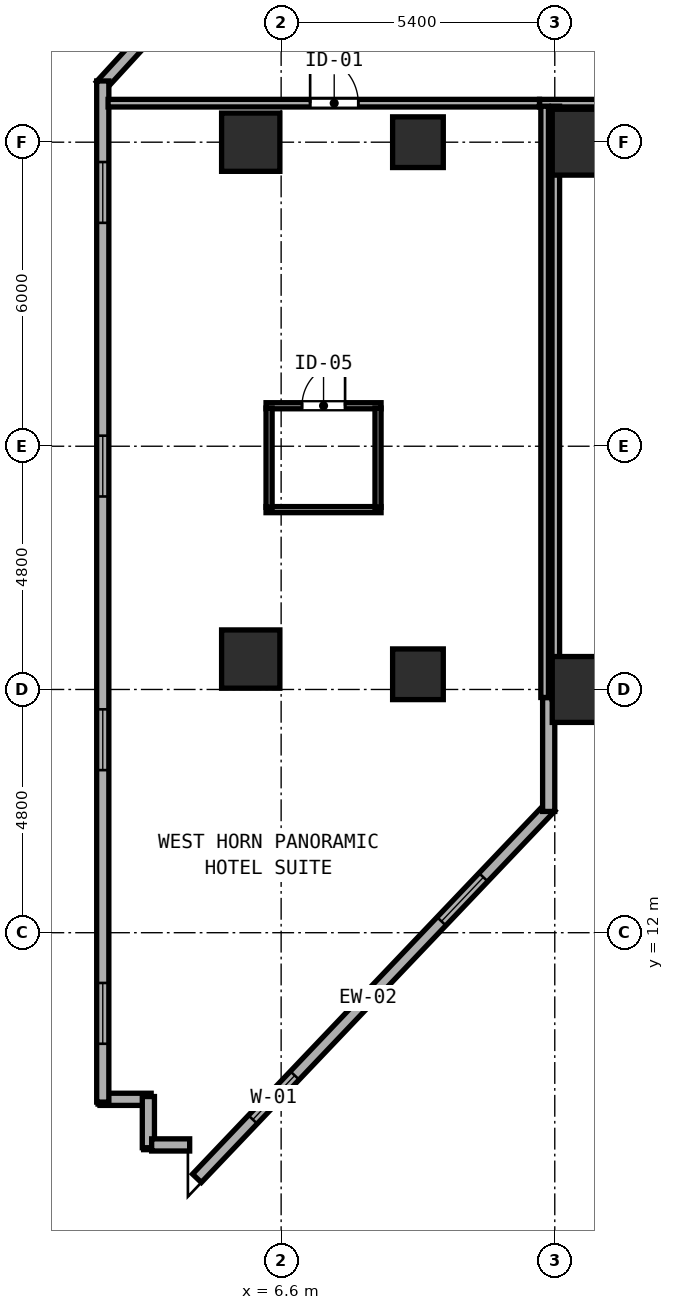
"""IFC4 building model, lengths in metres.
Left out: names, types, materials, properties, quantities, classifications, styles, units other than length and angle.
Written with IfcOpenShell. Run it as: python <this file> out.ifc"""

import sys

from ifc_helpers import new_model, si_unit, direction, frame, frame_2d, origin, origin_2d, place, context, subcontext, project, spatial, rectangle, hollow_rectangle, extrude, element, fill, save


model = new_model("IFC4")
c1 = context("Model", 3, precision=1e-05, world=origin(), true_north=direction((0.0, 1.0)))
c2 = subcontext(c1, "Body", "Model", "MODEL_VIEW")
j1 = project(units=[si_unit("LENGTHUNIT", "METRE"), si_unit("PLANEANGLEUNIT", "RADIAN")], contexts=[c1])
p1 = place(None, origin())
s1 = spatial("IfcSite", under=j1, at=p1, CompositionType="ELEMENT")
p2 = place(p1, origin())
s2 = spatial("IfcBuilding", under=s1, at=p2, CompositionType="ELEMENT")
p3 = place(p2, frame((0.0, 0.0, 31.6)))
s3 = spatial("IfcBuildingStorey", under=s2, at=p3, CompositionType="ELEMENT", Elevation=31.6)
for number, where, z_axis, x_axis in (
    (1, (12.6, 16.8, 0.0), (0.0, 0.0, 1.0), (1.0, 0.0, 0.0)),
    (2, (12.6, 27.6, 0.0), (0.0, 0.0, 1.0), (1.0, 0.0, 0.0)),
):
    element("IfcColumn", number, at=place(p3, frame(where, z_axis=z_axis, x_axis=x_axis)), inside=s3, PredefinedType="COLUMN", context=c2, shape_type="SweptSolid", body=[
        extrude(hollow_rectangle(XDim=1.3, YDim=1.3, WallThickness=0.048, at=origin_2d()), origin(), (0.0, 0.0, 1.0), 3.8),
    ])
for number, where, z_axis, x_axis in (
    (3, (6.0, 17.4, 0.0), (0.0, 0.0, 1.0), (1.0, 0.0, 0.0)),
    (4, (6.0, 27.6, 0.0), (0.0, 0.0, 1.0), (1.0, 0.0, 0.0)),
):
    element("IfcColumn", number, at=place(p3, frame(where, z_axis=z_axis, x_axis=x_axis)), inside=s3, PredefinedType="COLUMN", context=c2, shape_type="SweptSolid", body=[
        extrude(hollow_rectangle(XDim=1.15, YDim=1.15, WallThickness=0.042, at=origin_2d()), origin(), (0.0, 0.0, 1.0), 3.8),
    ])
for number, where, z_axis, x_axis in (
    (5, (9.3, 17.1, 0.0), (0.0, 0.0, 1.0), (1.0, 0.0, 0.0)),
    (6, (9.3, 27.6, 0.0), (0.0, 0.0, 1.0), (1.0, 0.0, 0.0)),
):
    element("IfcColumn", number, at=place(p3, frame(where, z_axis=z_axis, x_axis=x_axis)), inside=s3, PredefinedType="COLUMN", context=c2, shape_type="SweptSolid", body=[
        extrude(hollow_rectangle(XDim=1.0, YDim=1.0, WallThickness=0.038, at=origin_2d()), origin(), (0.0, 0.0, 1.0), 3.8),
    ])
for number, where, z_axis, x_axis in (
    (7, (3.025, 8.712, 0.0), (0.0, 0.0, 1.0), (1.0, 0.0, 0.0)),
    (8, (3.98, 8.767, 0.0), (0.0, 0.0, 1.0), (0.0, -1.0, 0.0)),
):
    element("IfcWall", number, at=place(p3, frame(where, z_axis=z_axis, x_axis=x_axis)), inside=s3, PredefinedType="SOLIDWALL", context=c2, shape_type="SweptSolid", body=[
        extrude(rectangle(XDim=1.01, YDim=0.24, at=frame_2d((0.505, 0.0))), origin(), (0.0, 0.0, 1.0), 3.6),
    ])
p4 = place(p3, frame((4.045, 7.812, 0.0), z_axis=(0.0, 0.0, 1.0), x_axis=(1.0, 0.0, 0.0)))
e9 = element("IfcWall", 9, at=p4, inside=s3, PredefinedType="SOLIDWALL", context=c2, shape_type="SweptSolid", body=[
    extrude(rectangle(XDim=0.75, YDim=0.24, at=frame_2d((0.375, 0.0))), origin(), (0.0, 0.0, 1.0), 3.6),
])
p5 = place(p3, frame((4.939, 7.154, 0.0), z_axis=(0.0, 0.0, 1.0), x_axis=(0.689370300416, 0.724409130881, 0.0)))
e10 = element("IfcWall", 10, at=p5, inside=s3, PredefinedType="SOLIDWALL", context=c2, shape_type="SweptSolid", body=[
    extrude(rectangle(XDim=10.124, YDim=0.24, at=frame_2d((5.062, 0.0))), origin(), (0.0, 0.0, 1.0), 3.6),
])
p6 = place(p5, frame((1.6, 0.0, 0.85)))
e11 = element("IfcOpeningElement", 11, at=p6, cuts=e10, PredefinedType="OPENING", context=c2, shape_type="SweptSolid", body=[
    extrude(rectangle(XDim=1.2, YDim=1.85, at=frame_2d((0.6, 0.925))), frame((0.0, 0.13, 0.0), z_axis=(0.0, -1.0, 0.0), x_axis=(1.0, 0.0, 0.0)), (0.0, 0.0, 1.0), 0.26),
])
p7 = place(p5, frame((7.0, 0.0, 0.85)))
e12 = element("IfcOpeningElement", 12, at=p7, cuts=e10, PredefinedType="OPENING", context=c2, shape_type="SweptSolid", body=[
    extrude(rectangle(XDim=1.2, YDim=1.85, at=frame_2d((0.6, 0.925))), frame((0.0, 0.13, 0.0), z_axis=(0.0, -1.0, 0.0), x_axis=(1.0, 0.0, 0.0)), (0.0, 0.0, 1.0), 0.26),
])
p8 = place(p3, frame((11.88, 14.393, 0.0), z_axis=(0.0, 0.0, 1.0), x_axis=(0.0, 1.0, 0.0)))
e13 = element("IfcWall", 13, at=p8, inside=s3, PredefinedType="SOLIDWALL", context=c2, shape_type="SweptSolid", body=[
    extrude(rectangle(XDim=2.247, YDim=0.24, at=frame_2d((1.124, 0.0))), origin(), (0.0, 0.0, 1.0), 3.6),
])
p9 = place(p3, frame((5.265, 31.137, 0.0), z_axis=(0.0, 0.0, 1.0), x_axis=(-0.675785130265, -0.737098675696, 0.0)))
e14 = element("IfcWall", 14, at=p9, inside=s3, PredefinedType="SOLIDWALL", context=c2, shape_type="SweptSolid", body=[
    extrude(rectangle(XDim=3.289, YDim=0.24, at=frame_2d((1.645, 0.0))), origin(), (0.0, 0.0, 1.0), 3.6),
])
p10 = place(p3, frame((3.08, 28.808, 0.0), z_axis=(0.0, 0.0, 1.0), x_axis=(0.0, -1.0, 0.0)))
e15 = element("IfcWall", 15, at=p10, inside=s3, PredefinedType="SOLIDWALL", context=c2, shape_type="SweptSolid", body=[
    extrude(rectangle(XDim=20.151, YDim=0.24, at=frame_2d((10.076, 0.0))), origin(), (0.0, 0.0, 1.0), 3.6),
])
p11 = place(p10, frame((1.6, 0.0, 0.85)))
e16 = element("IfcOpeningElement", 16, at=p11, cuts=e15, PredefinedType="OPENING", context=c2, shape_type="SweptSolid", body=[
    extrude(rectangle(XDim=1.2, YDim=1.85, at=frame_2d((0.6, 0.925))), frame((0.0, 0.13, 0.0), z_axis=(0.0, -1.0, 0.0), x_axis=(1.0, 0.0, 0.0)), (0.0, 0.0, 1.0), 0.26),
])
p12 = place(p10, frame((7.0, 0.0, 0.85)))
e17 = element("IfcOpeningElement", 17, at=p12, cuts=e15, PredefinedType="OPENING", context=c2, shape_type="SweptSolid", body=[
    extrude(rectangle(XDim=1.2, YDim=1.85, at=frame_2d((0.6, 0.925))), frame((0.0, 0.13, 0.0), z_axis=(0.0, -1.0, 0.0), x_axis=(1.0, 0.0, 0.0)), (0.0, 0.0, 1.0), 0.26),
])
p13 = place(p10, frame((12.4, 0.0, 0.85)))
e18 = element("IfcOpeningElement", 18, at=p13, cuts=e15, PredefinedType="OPENING", context=c2, shape_type="SweptSolid", body=[
    extrude(rectangle(XDim=1.2, YDim=1.85, at=frame_2d((0.6, 0.925))), frame((0.0, 0.13, 0.0), z_axis=(0.0, -1.0, 0.0), x_axis=(1.0, 0.0, 0.0)), (0.0, 0.0, 1.0), 0.26),
])
p14 = place(p10, frame((17.8, 0.0, 0.85)))
e19 = element("IfcOpeningElement", 19, at=p14, cuts=e15, PredefinedType="OPENING", context=c2, shape_type="SweptSolid", body=[
    extrude(rectangle(XDim=1.2, YDim=1.85, at=frame_2d((0.6, 0.925))), frame((0.0, 0.13, 0.0), z_axis=(0.0, -1.0, 0.0), x_axis=(1.0, 0.0, 0.0)), (0.0, 0.0, 1.0), 0.26),
])
p15 = place(p3, frame((11.7, 28.37, 0.0), z_axis=(0.0, 0.0, 1.0), x_axis=(1.0, 0.0, 0.0)))
e20 = element("IfcWall", 20, at=p15, inside=s3, PredefinedType="PARTITIONING", context=c2, shape_type="SweptSolid", body=[
    extrude(rectangle(XDim=5.81, YDim=0.15, at=frame_2d((2.905, 0.0))), origin(), (0.0, 0.0, 1.0), 3.6),
])
p16 = place(p15, frame((5.488, 0.0, 0.0), z_axis=(0.0, 0.0, 1.0), x_axis=(-1.0, 0.0, 0.0)))
e21 = element("IfcOpeningElement", 21, at=p16, cuts=e20, PredefinedType="OPENING", context=c2, shape_type="SweptSolid", body=[
    extrude(rectangle(XDim=0.95, YDim=2.18, at=frame_2d((0.475, 1.09))), frame((0.0, 0.085, 0.0), z_axis=(0.0, -1.0, 0.0), x_axis=(1.0, 0.0, 0.0)), (0.0, 0.0, 1.0), 0.17),
])
p17 = place(p3, frame((11.8, 16.642, 0.0), z_axis=(0.0, 0.0, 1.0), x_axis=(0.0, 1.0, 0.0)))
e22 = element("IfcWall", 22, at=p17, inside=s3, PredefinedType="PARTITIONING", context=c2, shape_type="SweptSolid", body=[
    extrude(rectangle(XDim=11.668, YDim=0.15, at=frame_2d((5.834, 0.0))), origin(), (0.0, 0.0, 1.0), 3.6),
])
p18 = place(p3, frame((3.185, 28.37, 0.0), z_axis=(0.0, 0.0, 1.0), x_axis=(1.0, 0.0, 0.0)))
e23 = element("IfcWall", 23, at=p18, inside=s3, PredefinedType="PARTITIONING", context=c2, shape_type="SweptSolid", body=[
    extrude(rectangle(XDim=8.513, YDim=0.15, at=frame_2d((4.256, 0.0))), origin(), (0.0, 0.0, 1.0), 3.6),
])
p19 = place(p18, frame((4.937, 0.0, 0.0), z_axis=(0.0, 0.0, 1.0), x_axis=(-1.0, 0.0, 0.0)))
e24 = element("IfcOpeningElement", 24, at=p19, cuts=e23, PredefinedType="OPENING", context=c2, shape_type="SweptSolid", body=[
    extrude(rectangle(XDim=0.95, YDim=2.18, at=frame_2d((0.475, 1.09))), frame((0.0, 0.085, 0.0), z_axis=(0.0, -1.0, 0.0), x_axis=(1.0, 0.0, 0.0)), (0.0, 0.0, 1.0), 0.17),
])
p20 = place(p3, frame((12.02, 16.612, 0.0), z_axis=(0.0, 0.0, 1.0), x_axis=(0.0, 1.0, 0.0)))
e25 = element("IfcWall", 25, at=p20, inside=s3, PredefinedType="PARTITIONING", context=c2, shape_type="SweptSolid", body=[
    extrude(rectangle(XDim=11.698, YDim=0.15, at=frame_2d((5.849, 0.0))), origin(), (0.0, 0.0, 1.0), 3.6),
])
p21 = place(p3, frame((6.302, 22.399, 0.0), z_axis=(0.0, 0.0, 1.0), x_axis=(1.0, 0.0, 0.0)))
e26 = element("IfcWall", 26, at=p21, inside=s3, PredefinedType="PARTITIONING", context=c2, shape_type="SweptSolid", body=[
    extrude(rectangle(XDim=2.27, YDim=0.12, at=frame_2d((1.135, 0.0))), origin(), (0.0, 0.0, 1.0), 3.6),
])
p22 = place(p21, frame((1.56, 0.0, 0.0), z_axis=(0.0, 0.0, 1.0), x_axis=(-1.0, 0.0, 0.0)))
e27 = element("IfcOpeningElement", 27, at=p22, cuts=e26, PredefinedType="OPENING", context=c2, shape_type="SweptSolid", body=[
    extrude(rectangle(XDim=0.85, YDim=2.1, at=frame_2d((0.425, 1.05))), frame((0.0, 0.07, 0.0), z_axis=(0.0, -1.0, 0.0), x_axis=(1.0, 0.0, 0.0)), (0.0, 0.0, 1.0), 0.14),
])
p23 = place(p3, frame((6.302, 20.349, 0.0), z_axis=(0.0, 0.0, 1.0), x_axis=(1.0, 0.0, 0.0)))
e28 = element("IfcWall", 28, at=p23, inside=s3, PredefinedType="PARTITIONING", context=c2, shape_type="SweptSolid", body=[
    extrude(rectangle(XDim=2.27, YDim=0.12, at=frame_2d((1.135, 0.0))), origin(), (0.0, 0.0, 1.0), 3.6),
])
for number, where, z_axis, x_axis in (
    (29, (6.362, 20.394, 0.0), (0.0, 0.0, 1.0), (0.0, 1.0, 0.0)),
    (30, (8.512, 20.394, 0.0), (0.0, 0.0, 1.0), (0.0, 1.0, 0.0)),
):
    element("IfcWall", number, at=place(p3, frame(where, z_axis=z_axis, x_axis=x_axis)), inside=s3, PredefinedType="PARTITIONING", context=c2, shape_type="SweptSolid", body=[
        extrude(rectangle(XDim=1.96, YDim=0.12, at=frame_2d((0.98, 0.0))), origin(), (0.0, 0.0, 1.0), 3.6),
    ])
p24 = place(p6, origin())
e31 = element("IfcWindow", 31, at=p24, inside=s3, PartitioningType="SINGLE_PANEL", PredefinedType="WINDOW", context=c2, shape_type="SweptSolid", body=[
    extrude(rectangle(XDim=1.2, YDim=1.85, at=frame_2d((0.6, 0.925))), frame((0.0, 0.03, 0.0), z_axis=(0.0, -1.0, 0.0), x_axis=(1.0, 0.0, 0.0)), (0.0, 0.0, 1.0), 0.06),
])
fill(e11, e31)
p25 = place(p7, origin())
e32 = element("IfcWindow", 32, at=p25, inside=s3, PartitioningType="SINGLE_PANEL", PredefinedType="WINDOW", context=c2, shape_type="SweptSolid", body=[
    extrude(rectangle(XDim=1.2, YDim=1.85, at=frame_2d((0.6, 0.925))), frame((0.0, 0.03, 0.0), z_axis=(0.0, -1.0, 0.0), x_axis=(1.0, 0.0, 0.0)), (0.0, 0.0, 1.0), 0.06),
])
fill(e12, e32)
p26 = place(p11, origin())
e33 = element("IfcWindow", 33, at=p26, inside=s3, PartitioningType="SINGLE_PANEL", PredefinedType="WINDOW", context=c2, shape_type="SweptSolid", body=[
    extrude(rectangle(XDim=1.2, YDim=1.85, at=frame_2d((0.6, 0.925))), frame((0.0, 0.03, 0.0), z_axis=(0.0, -1.0, 0.0), x_axis=(1.0, 0.0, 0.0)), (0.0, 0.0, 1.0), 0.06),
])
fill(e16, e33)
p27 = place(p12, origin())
e34 = element("IfcWindow", 34, at=p27, inside=s3, PartitioningType="SINGLE_PANEL", PredefinedType="WINDOW", context=c2, shape_type="SweptSolid", body=[
    extrude(rectangle(XDim=1.2, YDim=1.85, at=frame_2d((0.6, 0.925))), frame((0.0, 0.03, 0.0), z_axis=(0.0, -1.0, 0.0), x_axis=(1.0, 0.0, 0.0)), (0.0, 0.0, 1.0), 0.06),
])
fill(e17, e34)
p28 = place(p13, origin())
e35 = element("IfcWindow", 35, at=p28, inside=s3, PartitioningType="SINGLE_PANEL", PredefinedType="WINDOW", context=c2, shape_type="SweptSolid", body=[
    extrude(rectangle(XDim=1.2, YDim=1.85, at=frame_2d((0.6, 0.925))), frame((0.0, 0.03, 0.0), z_axis=(0.0, -1.0, 0.0), x_axis=(1.0, 0.0, 0.0)), (0.0, 0.0, 1.0), 0.06),
])
fill(e18, e35)
p29 = place(p14, origin())
e36 = element("IfcWindow", 36, at=p29, inside=s3, PartitioningType="SINGLE_PANEL", PredefinedType="WINDOW", context=c2, shape_type="SweptSolid", body=[
    extrude(rectangle(XDim=1.2, YDim=1.85, at=frame_2d((0.6, 0.925))), frame((0.0, 0.03, 0.0), z_axis=(0.0, -1.0, 0.0), x_axis=(1.0, 0.0, 0.0)), (0.0, 0.0, 1.0), 0.06),
])
fill(e19, e36)
p30 = place(p19, origin())
e37 = element("IfcDoor", 37, at=p30, inside=s3, OperationType="SINGLE_SWING_RIGHT", PredefinedType="DOOR", context=c2, shape_type="SweptSolid", body=[
    extrude(rectangle(XDim=0.95, YDim=2.18, at=frame_2d((0.475, 1.09))), frame((0.0, 0.025, 0.0), z_axis=(0.0, -1.0, 0.0), x_axis=(1.0, 0.0, 0.0)), (0.0, 0.0, 1.0), 0.05),
])
fill(e24, e37)
p31 = place(p22, origin())
e38 = element("IfcDoor", 38, at=p31, inside=s3, OperationType="SINGLE_SWING_LEFT", PredefinedType="DOOR", context=c2, shape_type="SweptSolid", body=[
    extrude(rectangle(XDim=0.85, YDim=2.1, at=frame_2d((0.425, 1.05))), frame((0.0, 0.025, 0.0), z_axis=(0.0, -1.0, 0.0), x_axis=(1.0, 0.0, 0.0)), (0.0, 0.0, 1.0), 0.05),
])
fill(e27, e38)
save(model, sys.argv[1])
